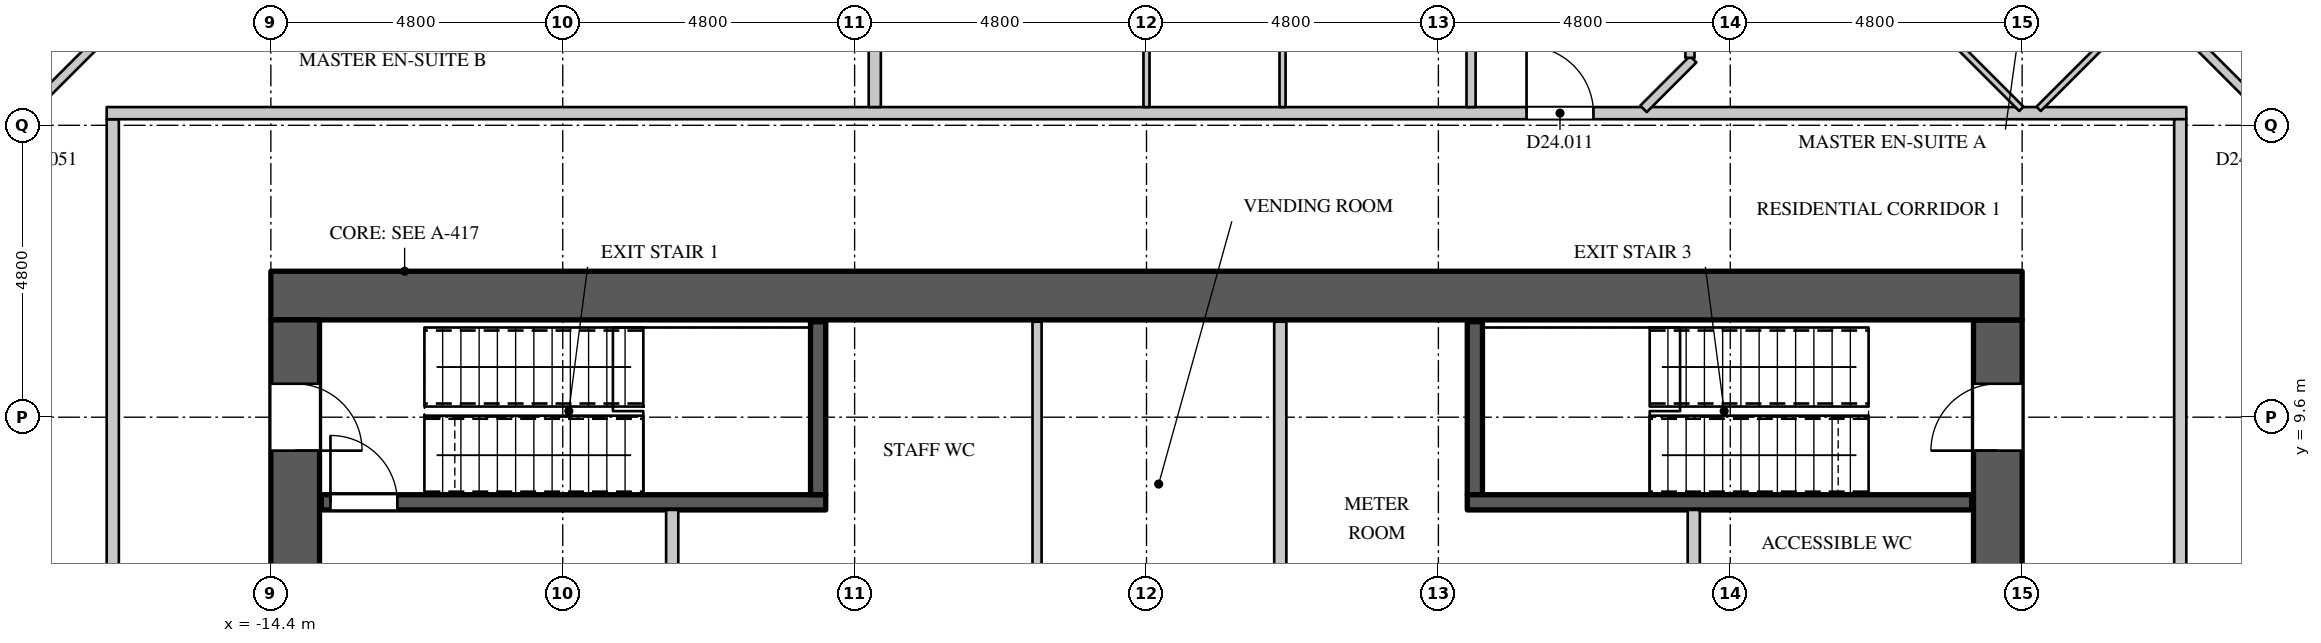
"""IFC4 building model, lengths in metres.
Left out: names, types, materials, properties, quantities, classifications, styles, units other than length and angle.
Written with IfcOpenShell. Run it as: python <this file> out.ifc"""

import sys

from ifc_helpers import new_model, si_unit, direction, frame, frame_2d, origin, place, context, subcontext, project, spatial, rectangle, extrude, element, fill, save


model = new_model("IFC4")
c1 = context("Model", 3, precision=1e-05, world=origin(), true_north=direction((0.0, 1.0)))
c2 = subcontext(c1, "Body", "Model", "MODEL_VIEW")
j1 = project(units=[si_unit("LENGTHUNIT", "METRE"), si_unit("PLANEANGLEUNIT", "RADIAN")], contexts=[c1])
p1 = place(None, origin())
s1 = spatial("IfcSite", under=j1, at=p1, CompositionType="ELEMENT")
p2 = place(p1, origin())
s2 = spatial("IfcBuilding", under=s1, at=p2, CompositionType="ELEMENT")
p3 = place(p2, frame((0.0, 0.0, 106.5)))
s3 = spatial("IfcBuildingStorey", under=s2, at=p3, CompositionType="ELEMENT", Elevation=106.5)
p4 = place(p3, frame((-14.4, 11.6, 0.0), z_axis=(0.0, 0.0, 1.0), x_axis=(1.0, 0.0, 0.0)))
e1 = element("IfcWall", 1, at=p4, inside=s3, PredefinedType="SHEAR", context=c2, shape_type="SweptSolid", body=[
    extrude(rectangle(XDim=28.8, YDim=0.8, at=frame_2d((14.4, 0.0))), origin(), (0.0, 0.0, 1.0), 4.2),
])
p5 = place(p3, frame((14.0, -11.2, 0.0), z_axis=(0.0, 0.0, 1.0), x_axis=(0.0, 1.0, 0.0)))
e2 = element("IfcWall", 2, at=p5, inside=s3, PredefinedType="SHEAR", context=c2, shape_type="SweptSolid", body=[
    extrude(rectangle(XDim=22.4, YDim=0.8, at=frame_2d((11.2, 0.0))), origin(), (0.0, 0.0, 1.0), 4.2),
])
p6 = place(p5, frame((20.25, 0.0, 0.0)))
e3 = element("IfcOpeningElement", 3, at=p6, cuts=e2, PredefinedType="OPENING", context=c2, shape_type="SweptSolid", body=[
    extrude(rectangle(XDim=1.1, YDim=2.2, at=frame_2d((0.55, 1.1))), frame((0.0, 0.41, 0.0), z_axis=(0.0, -1.0, 0.0), x_axis=(1.0, 0.0, 0.0)), (0.0, 0.0, 1.0), 0.82),
])
p7 = place(p5, frame((1.05, 0.0, 0.0)))
e4 = element("IfcOpeningElement", 4, at=p7, cuts=e2, PredefinedType="OPENING", context=c2, shape_type="SweptSolid", body=[
    extrude(rectangle(XDim=1.1, YDim=2.2, at=frame_2d((0.55, 1.1))), frame((0.0, 0.41, 0.0), z_axis=(0.0, -1.0, 0.0), x_axis=(1.0, 0.0, 0.0)), (0.0, 0.0, 1.0), 0.82),
])
p8 = place(p5, frame((14.75, 0.0, 0.0)))
e5 = element("IfcOpeningElement", 5, at=p8, cuts=e2, PredefinedType="OPENING", context=c2, shape_type="SweptSolid", body=[
    extrude(rectangle(XDim=1.5, YDim=2.4, at=frame_2d((0.75, 1.2))), frame((0.0, 0.41, 0.0), z_axis=(0.0, -1.0, 0.0), x_axis=(1.0, 0.0, 0.0)), (0.0, 0.0, 1.0), 0.82),
])
p9 = place(p5, frame((6.15, 0.0, 0.0)))
e6 = element("IfcOpeningElement", 6, at=p9, cuts=e2, PredefinedType="OPENING", context=c2, shape_type="SweptSolid", body=[
    extrude(rectangle(XDim=1.5, YDim=2.4, at=frame_2d((0.75, 1.2))), frame((0.0, 0.41, 0.0), z_axis=(0.0, -1.0, 0.0), x_axis=(1.0, 0.0, 0.0)), (0.0, 0.0, 1.0), 0.82),
])
p10 = place(p3, frame((-14.0, -11.2, 0.0), z_axis=(0.0, 0.0, 1.0), x_axis=(0.0, 1.0, 0.0)))
e7 = element("IfcWall", 7, at=p10, inside=s3, PredefinedType="SHEAR", context=c2, shape_type="SweptSolid", body=[
    extrude(rectangle(XDim=22.4, YDim=0.8, at=frame_2d((11.2, 0.0))), origin(), (0.0, 0.0, 1.0), 4.2),
])
p11 = place(p10, frame((20.25, 0.0, 0.0)))
e8 = element("IfcOpeningElement", 8, at=p11, cuts=e7, PredefinedType="OPENING", context=c2, shape_type="SweptSolid", body=[
    extrude(rectangle(XDim=1.1, YDim=2.2, at=frame_2d((0.55, 1.1))), frame((0.0, 0.41, 0.0), z_axis=(0.0, -1.0, 0.0), x_axis=(1.0, 0.0, 0.0)), (0.0, 0.0, 1.0), 0.82),
])
p12 = place(p10, frame((1.05, 0.0, 0.0)))
e9 = element("IfcOpeningElement", 9, at=p12, cuts=e7, PredefinedType="OPENING", context=c2, shape_type="SweptSolid", body=[
    extrude(rectangle(XDim=1.1, YDim=2.2, at=frame_2d((0.55, 1.1))), frame((0.0, 0.41, 0.0), z_axis=(0.0, -1.0, 0.0), x_axis=(1.0, 0.0, 0.0)), (0.0, 0.0, 1.0), 0.82),
])
p13 = place(p10, frame((15.95, 0.0, 0.0)))
e10 = element("IfcOpeningElement", 10, at=p13, cuts=e7, PredefinedType="OPENING", context=c2, shape_type="SweptSolid", body=[
    extrude(rectangle(XDim=1.5, YDim=2.4, at=frame_2d((0.75, 1.2))), frame((0.0, 0.41, 0.0), z_axis=(0.0, -1.0, 0.0), x_axis=(1.0, 0.0, 0.0)), (0.0, 0.0, 1.0), 0.82),
])
p14 = place(p10, frame((4.95, 0.0, 0.0)))
e11 = element("IfcOpeningElement", 11, at=p14, cuts=e7, PredefinedType="OPENING", context=c2, shape_type="SweptSolid", body=[
    extrude(rectangle(XDim=1.5, YDim=2.4, at=frame_2d((0.75, 1.2))), frame((0.0, 0.41, 0.0), z_axis=(0.0, -1.0, 0.0), x_axis=(1.0, 0.0, 0.0)), (0.0, 0.0, 1.0), 0.82),
])
p15 = place(p3, frame((-17.0, -14.5, 0.0), z_axis=(0.0, 0.0, 1.0), x_axis=(0.0, 1.0, 0.0)))
e12 = element("IfcWall", 12, at=p15, inside=s3, PredefinedType="PARTITIONING", context=c2, shape_type="SweptSolid", body=[
    extrude(rectangle(XDim=29.0, YDim=0.2, at=frame_2d((14.5, 0.0))), origin(), (0.0, 0.0, 1.0), 3.95),
])
p16 = place(p15, frame((11.5, 0.0, 0.0)))
e13 = element("IfcOpeningElement", 13, at=p16, cuts=e12, PredefinedType="OPENING", context=c2, shape_type="SweptSolid", body=[
    extrude(rectangle(XDim=1.1, YDim=2.4, at=frame_2d((0.55, 1.2))), frame((0.0, 0.11, 0.0), z_axis=(0.0, -1.0, 0.0), x_axis=(1.0, 0.0, 0.0)), (0.0, 0.0, 1.0), 0.22),
])
p17 = place(p3, frame((-17.1, 14.6, 0.0), z_axis=(0.0, 0.0, 1.0), x_axis=(1.0, 0.0, 0.0)))
e14 = element("IfcWall", 14, at=p17, inside=s3, PredefinedType="PARTITIONING", context=c2, shape_type="SweptSolid", body=[
    extrude(rectangle(XDim=34.2, YDim=0.2, at=frame_2d((17.1, 0.0))), origin(), (0.0, 0.0, 1.0), 3.95),
])
p18 = place(p17, frame((23.35, 0.0, 0.0)))
e15 = element("IfcOpeningElement", 15, at=p18, cuts=e14, PredefinedType="OPENING", context=c2, shape_type="SweptSolid", body=[
    extrude(rectangle(XDim=1.1, YDim=2.4, at=frame_2d((0.55, 1.2))), frame((0.0, 0.11, 0.0), z_axis=(0.0, -1.0, 0.0), x_axis=(1.0, 0.0, 0.0)), (0.0, 0.0, 1.0), 0.22),
])
p19 = place(p3, frame((-7.8, 2.8, 0.0), z_axis=(0.0, 0.0, 1.0), x_axis=(0.0, 1.0, 0.0)))
e16 = element("IfcWall", 16, at=p19, inside=s3, PredefinedType="PARTITIONING", context=c2, shape_type="SweptSolid", body=[
    extrude(rectangle(XDim=5.275, YDim=0.2, at=frame_2d((2.637, 0.0))), origin(), (0.0, 0.0, 1.0), 3.95),
])
p20 = place(p19, frame((0.75, 0.0, 0.0)))
e17 = element("IfcOpeningElement", 17, at=p20, cuts=e16, PredefinedType="OPENING", context=c2, shape_type="SweptSolid", body=[
    extrude(rectangle(XDim=1.5, YDim=2.4, at=frame_2d((0.75, 1.2))), frame((0.0, 0.11, 0.0), z_axis=(0.0, -1.0, 0.0), x_axis=(1.0, 0.0, 0.0)), (0.0, 0.0, 1.0), 0.22),
])
p21 = place(p3, frame((17.0, -14.5, 0.0), z_axis=(0.0, 0.0, 1.0), x_axis=(0.0, 1.0, 0.0)))
e18 = element("IfcWall", 18, at=p21, inside=s3, PredefinedType="PARTITIONING", context=c2, shape_type="SweptSolid", body=[
    extrude(rectangle(XDim=29.0, YDim=0.2, at=frame_2d((14.5, 0.0))), origin(), (0.0, 0.0, 1.0), 3.95),
])
p22 = place(p21, frame((11.55, 0.0, 0.0)))
e19 = element("IfcOpeningElement", 19, at=p22, cuts=e18, PredefinedType="OPENING", context=c2, shape_type="SweptSolid", body=[
    extrude(rectangle(XDim=1.1, YDim=2.4, at=frame_2d((0.55, 1.2))), frame((0.0, 0.11, 0.0), z_axis=(0.0, -1.0, 0.0), x_axis=(1.0, 0.0, 0.0)), (0.0, 0.0, 1.0), 0.22),
])
p23 = place(p3, frame((-21.547, 11.471, 0.0), z_axis=(0.0, 0.0, 1.0), x_axis=(0.707106781187, 0.707106781187, 0.0)))
e20 = element("IfcWall", 20, at=p23, inside=s3, PredefinedType="PARTITIONING", context=c2, shape_type="SweptSolid", body=[
    extrude(rectangle(XDim=7.05, YDim=0.15, at=frame_2d((3.525, 0.0))), origin(), (0.0, 0.0, 1.0), 3.95),
])
p24 = place(p23, frame((2.85, 0.0, 0.0)))
e21 = element("IfcOpeningElement", 21, at=p24, cuts=e20, PredefinedType="OPENING", context=c2, shape_type="SweptSolid", body=[
    extrude(rectangle(XDim=0.95, YDim=2.2, at=frame_2d((0.475, 1.1))), frame((0.0, 0.085, 0.0), z_axis=(0.0, -1.0, 0.0), x_axis=(1.0, 0.0, 0.0)), (0.0, 0.0, 1.0), 0.17),
])
p25 = place(p3, frame((-1.8, 5.9, 0.0), z_axis=(0.0, 0.0, 1.0), x_axis=(0.0, 1.0, 0.0)))
e22 = element("IfcWall", 22, at=p25, inside=s3, PredefinedType="PARTITIONING", context=c2, shape_type="SweptSolid", body=[
    extrude(rectangle(XDim=5.27, YDim=0.15, at=frame_2d((2.635, 0.0))), origin(), (0.0, 0.0, 1.0), 3.95),
])
p26 = place(p3, frame((5.337, 14.7, 0.0), z_axis=(0.0, 0.0, 1.0), x_axis=(0.0, 1.0, 0.0)))
e23 = element("IfcWall", 23, at=p26, inside=s3, PredefinedType="PARTITIONING", context=c2, shape_type="SweptSolid", body=[
    extrude(rectangle(XDim=6.025, YDim=0.15, at=frame_2d((3.013, 0.0))), origin(), (0.0, 0.0, 1.0), 3.95),
])
p27 = place(p26, frame((2.55, 0.0, 0.0)))
e24 = element("IfcOpeningElement", 24, at=p27, cuts=e23, PredefinedType="OPENING", context=c2, shape_type="SweptSolid", body=[
    extrude(rectangle(XDim=0.95, YDim=2.2, at=frame_2d((0.475, 1.1))), frame((0.0, 0.085, 0.0), z_axis=(0.0, -1.0, 0.0), x_axis=(1.0, 0.0, 0.0)), (0.0, 0.0, 1.0), 0.17),
])
p28 = place(p3, frame((8.174, 14.671, 0.0), z_axis=(0.0, 0.0, 1.0), x_axis=(0.707106781187, 0.707106781187, 0.0)))
e25 = element("IfcWall", 25, at=p28, inside=s3, PredefinedType="PARTITIONING", context=c2, shape_type="SweptSolid", body=[
    extrude(rectangle(XDim=1.155, YDim=0.15, at=frame_2d((0.578, 0.0))), origin(), (0.0, 0.0, 1.0), 3.95),
])
p29 = place(p3, frame((8.937, 15.509, 0.0), z_axis=(0.0, 0.0, 1.0), x_axis=(0.0, 1.0, 0.0)))
e26 = element("IfcWall", 26, at=p29, inside=s3, PredefinedType="PARTITIONING", context=c2, shape_type="SweptSolid", body=[
    extrude(rectangle(XDim=10.946, YDim=0.15, at=frame_2d((5.473, 0.0))), origin(), (0.0, 0.0, 1.0), 3.95),
])
p30 = place(p29, frame((2.1, 0.0, 0.0)))
e27 = element("IfcOpeningElement", 27, at=p30, cuts=e26, PredefinedType="OPENING", context=c2, shape_type="SweptSolid", body=[
    extrude(rectangle(XDim=0.95, YDim=2.2, at=frame_2d((0.475, 1.1))), frame((0.0, 0.085, 0.0), z_axis=(0.0, -1.0, 0.0), x_axis=(1.0, 0.0, 0.0)), (0.0, 0.0, 1.0), 0.17),
])
p31 = place(p29, frame((7.75, 0.0, 0.0)))
e28 = element("IfcOpeningElement", 28, at=p31, cuts=e26, PredefinedType="OPENING", context=c2, shape_type="SweptSolid", body=[
    extrude(rectangle(XDim=1.5, YDim=2.2, at=frame_2d((0.75, 1.1))), frame((0.0, 0.085, 0.0), z_axis=(0.0, -1.0, 0.0), x_axis=(1.0, 0.0, 0.0)), (0.0, 0.0, 1.0), 0.17),
])
p32 = place(p3, frame((16.562, 16.456, 0.0), z_axis=(0.0, 0.0, 1.0), x_axis=(0.707123735134, -0.707089826832, 0.0)))
e29 = element("IfcWall", 29, at=p32, inside=s3, PredefinedType="PARTITIONING", context=c2, shape_type="SweptSolid", body=[
    extrude(rectangle(XDim=7.2, YDim=0.15, at=frame_2d((3.6, 0.0))), origin(), (0.0, 0.0, 1.0), 3.95),
])
p33 = place(p32, frame((3.25, 0.0, 0.0)))
e30 = element("IfcOpeningElement", 30, at=p33, cuts=e29, PredefinedType="OPENING", context=c2, shape_type="SweptSolid", body=[
    extrude(rectangle(XDim=0.95, YDim=2.2, at=frame_2d((0.475, 1.1))), frame((0.0, 0.085, 0.0), z_axis=(0.0, -1.0, 0.0), x_axis=(1.0, 0.0, 0.0)), (0.0, 0.0, 1.0), 0.17),
])
p34 = place(p3, frame((-4.469, 14.7, 0.0), z_axis=(0.0, 0.0, 1.0), x_axis=(0.0, 1.0, 0.0)))
e31 = element("IfcWall", 31, at=p34, inside=s3, PredefinedType="PARTITIONING", context=c2, shape_type="SweptSolid", body=[
    extrude(rectangle(XDim=10.95, YDim=0.2, at=frame_2d((5.475, 0.0))), origin(), (0.0, 0.0, 1.0), 3.3),
])
p35 = place(p3, frame((2.2, 5.9, 0.0), z_axis=(0.0, 0.0, 1.0), x_axis=(0.0, 1.0, 0.0)))
e32 = element("IfcWall", 32, at=p35, inside=s3, PredefinedType="PARTITIONING", context=c2, shape_type="SweptSolid", body=[
    extrude(rectangle(XDim=5.27, YDim=0.2, at=frame_2d((2.635, 0.0))), origin(), (0.0, 0.0, 1.0), 3.95),
])
p36 = place(p3, frame((9.0, 5.9, 0.0), z_axis=(0.0, 0.0, 1.0), x_axis=(0.0, 1.0, 0.0)))
e33 = element("IfcWall", 33, at=p36, inside=s3, PredefinedType="PARTITIONING", context=c2, shape_type="SweptSolid", body=[
    extrude(rectangle(XDim=2.175, YDim=0.2, at=frame_2d((1.087, 0.0))), origin(), (0.0, 0.0, 1.0), 3.95),
])
p37 = place(p3, frame((-13.57, 8.2, 0.0), z_axis=(0.0, 0.0, 1.0), x_axis=(1.0, 0.0, 0.0)))
e34 = element("IfcWall", 34, at=p37, inside=s3, PredefinedType="SHEAR", context=c2, shape_type="SweptSolid", body=[
    extrude(rectangle(XDim=8.295, YDim=0.25, at=frame_2d((4.147, 0.0))), origin(), (0.0, 0.0, 1.0), 3.95),
])
p38 = place(p37, frame((0.15, 0.0, 0.0)))
e35 = element("IfcOpeningElement", 35, at=p38, cuts=e34, PredefinedType="OPENING", context=c2, shape_type="SweptSolid", body=[
    extrude(rectangle(XDim=1.1, YDim=2.2, at=frame_2d((0.55, 1.1))), frame((0.0, 0.135, 0.0), z_axis=(0.0, -1.0, 0.0), x_axis=(1.0, 0.0, 0.0)), (0.0, 0.0, 1.0), 0.27),
])
for number, where, z_axis, x_axis in (
    (36, (-5.4, 8.325, 0.0), (0.0, 0.0, 1.0), (0.0, 1.0, 0.0)),
    (37, (5.4, 8.325, 0.0), (0.0, 0.0, 1.0), (0.0, 1.0, 0.0)),
):
    element("IfcWall", number, at=place(p3, frame(where, z_axis=z_axis, x_axis=x_axis)), inside=s3, PredefinedType="SHEAR", context=c2, shape_type="SweptSolid", body=[
        extrude(rectangle(XDim=2.845, YDim=0.25, at=frame_2d((1.422, 0.0))), origin(), (0.0, 0.0, 1.0), 3.95),
    ])
p39 = place(p3, frame((5.275, 8.2, 0.0), z_axis=(0.0, 0.0, 1.0), x_axis=(1.0, 0.0, 0.0)))
e38 = element("IfcWall", 38, at=p39, inside=s3, PredefinedType="SHEAR", context=c2, shape_type="SweptSolid", body=[
    extrude(rectangle(XDim=8.295, YDim=0.25, at=frame_2d((4.147, 0.0))), origin(), (0.0, 0.0, 1.0), 3.95),
])
p40 = place(p3, frame((0.0, 14.7, 0.0), z_axis=(0.0, 0.0, 1.0), x_axis=(0.0, 1.0, 0.0)))
e39 = element("IfcWall", 39, at=p40, inside=s3, PredefinedType="PARTITIONING", context=c2, shape_type="SweptSolid", body=[
    extrude(rectangle(XDim=6.12, YDim=0.1, at=frame_2d((3.06, 0.0))), origin(), (0.0, 0.0, 1.0), 3.95),
])
p41 = place(p40, frame((2.55, 0.0, 0.0)))
e40 = element("IfcOpeningElement", 40, at=p41, cuts=e39, PredefinedType="OPENING", context=c2, shape_type="SweptSolid", body=[
    extrude(rectangle(XDim=0.9, YDim=2.2, at=frame_2d((0.45, 1.1))), frame((0.0, 0.06, 0.0), z_axis=(0.0, -1.0, 0.0), x_axis=(1.0, 0.0, 0.0)), (0.0, 0.0, 1.0), 0.12),
])
p42 = place(p3, frame((2.237, 14.7, 0.0), z_axis=(0.0, 0.0, 1.0), x_axis=(0.0, 1.0, 0.0)))
e41 = element("IfcWall", 41, at=p42, inside=s3, PredefinedType="PARTITIONING", context=c2, shape_type="SweptSolid", body=[
    extrude(rectangle(XDim=6.025, YDim=0.1, at=frame_2d((3.013, 0.0))), origin(), (0.0, 0.0, 1.0), 3.95),
])
p43 = place(p3, frame((12.726, 16.332, 0.0), z_axis=(0.0, 0.0, 1.0), x_axis=(0.707106781187, -0.707106781187, 0.0)))
e42 = element("IfcWall", 42, at=p43, inside=s3, PredefinedType="PARTITIONING", context=c2, shape_type="SweptSolid", body=[
    extrude(rectangle(XDim=2.35, YDim=0.1, at=frame_2d((1.175, 0.0))), origin(), (0.0, 0.0, 1.0), 3.95),
])
p44 = place(p3, frame((14.671, 14.671, 0.0), z_axis=(0.0, 0.0, 1.0), x_axis=(0.707106781187, 0.707106781187, 0.0)))
e43 = element("IfcWall", 43, at=p44, inside=s3, PredefinedType="PARTITIONING", context=c2, shape_type="SweptSolid", body=[
    extrude(rectangle(XDim=1.979, YDim=0.1, at=frame_2d((0.99, 0.0))), origin(), (0.0, 0.0, 1.0), 3.95),
])
p45 = place(p38, origin())
e44 = element("IfcDoor", 44, at=p45, inside=s3, OperationType="SINGLE_SWING_LEFT", PredefinedType="DOOR", context=c2, shape_type="SweptSolid", body=[
    extrude(rectangle(XDim=1.1, YDim=2.2, at=frame_2d((0.55, 1.1))), frame((0.0, 0.025, 0.0), z_axis=(0.0, -1.0, 0.0), x_axis=(1.0, 0.0, 0.0)), (0.0, 0.0, 1.0), 0.05),
])
fill(e35, e44)
p46 = place(p11, origin())
e45 = element("IfcDoor", 45, at=p46, inside=s3, OperationType="SINGLE_SWING_RIGHT", PredefinedType="DOOR", context=c2, shape_type="SweptSolid", body=[
    extrude(rectangle(XDim=1.1, YDim=2.2, at=frame_2d((0.55, 1.1))), frame((0.0, -0.345, 0.0), z_axis=(0.0, -1.0, 0.0), x_axis=(1.0, 0.0, 0.0)), (0.0, 0.0, 1.0), 0.05),
])
fill(e8, e45)
p47 = place(p6, origin())
e46 = element("IfcDoor", 46, at=p47, inside=s3, OperationType="SINGLE_SWING_LEFT", PredefinedType="DOOR", context=c2, shape_type="SweptSolid", body=[
    extrude(rectangle(XDim=1.1, YDim=2.2, at=frame_2d((0.55, 1.1))), frame((0.0, 0.395, 0.0), z_axis=(0.0, -1.0, 0.0), x_axis=(1.0, 0.0, 0.0)), (0.0, 0.0, 1.0), 0.05),
])
fill(e3, e46)
p48 = place(p18, origin())
e47 = element("IfcDoor", 47, at=p48, inside=s3, OperationType="SINGLE_SWING_LEFT", PredefinedType="DOOR", context=c2, shape_type="SweptSolid", body=[
    extrude(rectangle(XDim=1.1, YDim=2.4, at=frame_2d((0.55, 1.2))), frame((0.0, 0.025, 0.0), z_axis=(0.0, -1.0, 0.0), x_axis=(1.0, 0.0, 0.0)), (0.0, 0.0, 1.0), 0.05),
])
fill(e15, e47)
save(model, sys.argv[1])
